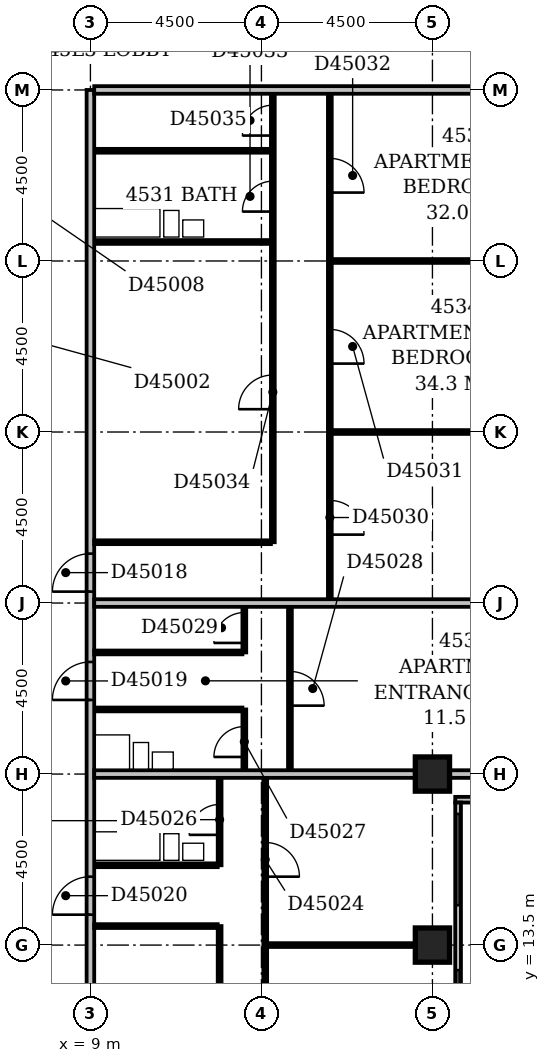
"""IFC4 building model, lengths in metres.
Left out: names, types, materials, properties, quantities, classifications, styles, units other than length and angle.
Written with IfcOpenShell. Run it as: python <this file> out.ifc"""

import sys

from ifc_helpers import new_model, si_unit, direction, frame, frame_2d, origin, origin_2d, place, context, subcontext, project, spatial, rectangle, extrude, element, fill, save


model = new_model("IFC4")
c1 = context("Model", 3, precision=1e-05, world=origin(), true_north=direction((0.0, 1.0)))
c2 = subcontext(c1, "Body", "Model", "MODEL_VIEW")
j1 = project(units=[si_unit("LENGTHUNIT", "METRE"), si_unit("PLANEANGLEUNIT", "RADIAN")], contexts=[c1])
p1 = place(None, origin())
s1 = spatial("IfcSite", under=j1, at=p1, CompositionType="ELEMENT")
p2 = place(p1, origin())
s2 = spatial("IfcBuilding", under=s1, at=p2, CompositionType="ELEMENT")
p3 = place(p2, frame((0.0, 0.0, 179.0)))
s3 = spatial("IfcBuildingStorey", under=s2, at=p3, CompositionType="ELEMENT", Elevation=179.0)
for number, where, z_axis, x_axis in (
    (1, (18.0, 13.5, -0.3), (0.0, 0.0, 1.0), (1.0, 0.0, 0.0)),
    (2, (18.0, 18.0, -0.3), (0.0, 0.0, 1.0), (1.0, 0.0, 0.0)),
):
    element("IfcColumn", number, at=place(p3, frame(where, z_axis=z_axis, x_axis=x_axis)), inside=s3, PredefinedType="COLUMN", context=c2, shape_type="SweptSolid", body=[
        extrude(rectangle(XDim=0.9, YDim=0.9, at=origin_2d()), origin(), (0.0, 0.0, 1.0), 3.6),
    ])
p4 = place(p3, frame((18.675, 8.4, 0.0), z_axis=(0.0, 0.0, 1.0), x_axis=(0.0, 1.0, 0.0)))
e3 = element("IfcWall", 3, at=p4, inside=s3, PredefinedType="STANDARD", context=c2, shape_type="SweptSolid", body=[
    extrude(rectangle(XDim=8.85, YDim=0.15, at=frame_2d((4.425, 0.0))), origin(), (0.0, 0.0, 1.0), 2.7),
])
p5 = place(p4, frame((1.291, 0.0, 0.6)))
e4 = element("IfcOpeningElement", 4, at=p5, cuts=e3, PredefinedType="OPENING", context=c2, shape_type="SweptSolid", body=[
    extrude(rectangle(XDim=0.45, YDim=1.8, at=frame_2d((0.225, 0.9))), frame((0.0, 0.087, 0.0), z_axis=(0.0, -1.0, 0.0), x_axis=(1.0, 0.0, 0.0)), (0.0, 0.0, 1.0), 0.174),
])
p6 = place(p4, frame((2.941, 0.0, 0.6)))
e5 = element("IfcOpeningElement", 5, at=p6, cuts=e3, PredefinedType="OPENING", context=c2, shape_type="SweptSolid", body=[
    extrude(rectangle(XDim=1.5, YDim=1.8, at=frame_2d((0.75, 0.9))), frame((0.0, 0.087, 0.0), z_axis=(0.0, -1.0, 0.0), x_axis=(1.0, 0.0, 0.0)), (0.0, 0.0, 1.0), 0.174),
])
p7 = place(p4, frame((6.15, 0.0, 0.6)))
e6 = element("IfcOpeningElement", 6, at=p7, cuts=e3, PredefinedType="OPENING", context=c2, shape_type="SweptSolid", body=[
    extrude(rectangle(XDim=2.4, YDim=1.8, at=frame_2d((1.2, 0.9))), frame((0.0, 0.087, 0.0), z_axis=(0.0, -1.0, 0.0), x_axis=(1.0, 0.0, 0.0)), (0.0, 0.0, 1.0), 0.174),
])
p8 = place(p3, frame((18.6, 17.325, 0.0), z_axis=(0.0, 0.0, 1.0), x_axis=(1.0, 0.0, 0.0)))
e7 = element("IfcWall", 7, at=p8, inside=s3, PredefinedType="STANDARD", context=c2, shape_type="SweptSolid", body=[
    extrude(rectangle(XDim=4.65, YDim=0.15, at=frame_2d((2.325, 0.0))), origin(), (0.0, 0.0, 1.0), 2.7),
])
p9 = place(p8, frame((0.45, 0.0, 0.6)))
e8 = element("IfcOpeningElement", 8, at=p9, cuts=e7, PredefinedType="OPENING", context=c2, shape_type="SweptSolid", body=[
    extrude(rectangle(XDim=2.4, YDim=1.8, at=frame_2d((1.2, 0.9))), frame((0.0, 0.087, 0.0), z_axis=(0.0, -1.0, 0.0), x_axis=(1.0, 0.0, 0.0)), (0.0, 0.0, 1.0), 0.174),
])
p10 = place(p3, frame((9.0, 5.0, 0.0), z_axis=(0.0, 0.0, 1.0), x_axis=(0.0, 1.0, 0.0)))
e9 = element("IfcWall", 9, at=p10, inside=s3, PredefinedType="PARTITIONING", context=c2, shape_type="SweptSolid", body=[
    extrude(rectangle(XDim=31.0, YDim=0.2, at=frame_2d((15.5, 0.0))), origin(), (0.0, 0.0, 1.0), 3.3),
])
p11 = place(p10, frame((17.8, 0.0, 0.0)))
e10 = element("IfcOpeningElement", 10, at=p11, cuts=e9, PredefinedType="OPENING", context=c2, shape_type="SweptSolid", body=[
    extrude(rectangle(XDim=1.0, YDim=2.1, at=frame_2d((0.5, 1.05))), frame((0.0, 0.112, 0.0), z_axis=(0.0, -1.0, 0.0), x_axis=(1.0, 0.0, 0.0)), (0.0, 0.0, 1.0), 0.224),
])
p12 = place(p10, frame((14.95, 0.0, 0.0)))
e11 = element("IfcOpeningElement", 11, at=p12, cuts=e9, PredefinedType="OPENING", context=c2, shape_type="SweptSolid", body=[
    extrude(rectangle(XDim=1.0, YDim=2.1, at=frame_2d((0.5, 1.05))), frame((0.0, 0.112, 0.0), z_axis=(0.0, -1.0, 0.0), x_axis=(1.0, 0.0, 0.0)), (0.0, 0.0, 1.0), 0.224),
])
p13 = place(p10, frame((9.3, 0.0, 0.0)))
e12 = element("IfcOpeningElement", 12, at=p13, cuts=e9, PredefinedType="OPENING", context=c2, shape_type="SweptSolid", body=[
    extrude(rectangle(XDim=1.0, YDim=2.1, at=frame_2d((0.5, 1.05))), frame((0.0, 0.112, 0.0), z_axis=(0.0, -1.0, 0.0), x_axis=(1.0, 0.0, 0.0)), (0.0, 0.0, 1.0), 0.224),
])
p14 = place(p10, frame((1.5, 0.0, 0.0)))
e13 = element("IfcOpeningElement", 13, at=p14, cuts=e9, PredefinedType="OPENING", context=c2, shape_type="SweptSolid", body=[
    extrude(rectangle(XDim=0.9, YDim=2.1, at=frame_2d((0.45, 1.05))), frame((0.0, 0.112, 0.0), z_axis=(0.0, -1.0, 0.0), x_axis=(1.0, 0.0, 0.0)), (0.0, 0.0, 1.0), 0.224),
])
p15 = place(p3, frame((12.4, 9.1, 0.0), z_axis=(0.0, 0.0, 1.0), x_axis=(0.0, 1.0, 0.0)))
e14 = element("IfcWall", 14, at=p15, inside=s3, PredefinedType="PARTITIONING", context=c2, shape_type="SweptSolid", body=[
    extrude(rectangle(XDim=4.9, YDim=0.1, at=frame_2d((2.45, 0.0))), origin(), (0.0, 0.0, 1.0), 3.3),
])
p16 = place(p15, frame((1.95, 0.0, 0.0)))
e15 = element("IfcOpeningElement", 15, at=p16, cuts=e14, PredefinedType="OPENING", context=c2, shape_type="SweptSolid", body=[
    extrude(rectangle(XDim=0.9, YDim=2.1, at=frame_2d((0.45, 1.05))), frame((0.0, 0.062, 0.0), z_axis=(0.0, -1.0, 0.0), x_axis=(1.0, 0.0, 0.0)), (0.0, 0.0, 1.0), 0.124),
])
p17 = place(p3, frame((13.6, 9.45, 0.0), z_axis=(0.0, 0.0, 1.0), x_axis=(0.0, 1.0, 0.0)))
e16 = element("IfcWall", 16, at=p17, inside=s3, PredefinedType="PARTITIONING", context=c2, shape_type="SweptSolid", body=[
    extrude(rectangle(XDim=8.45, YDim=0.1, at=frame_2d((4.225, 0.0))), origin(), (0.0, 0.0, 1.0), 3.3),
])
p18 = place(p17, frame((1.35, 0.0, 0.0)))
e17 = element("IfcOpeningElement", 17, at=p18, cuts=e16, PredefinedType="OPENING", context=c2, shape_type="SweptSolid", body=[
    extrude(rectangle(XDim=0.9, YDim=2.1, at=frame_2d((0.45, 1.05))), frame((0.0, 0.062, 0.0), z_axis=(0.0, -1.0, 0.0), x_axis=(1.0, 0.0, 0.0)), (0.0, 0.0, 1.0), 0.124),
])
p19 = place(p17, frame((5.85, 0.0, 0.0)))
e18 = element("IfcOpeningElement", 18, at=p19, cuts=e16, PredefinedType="OPENING", context=c2, shape_type="SweptSolid", body=[
    extrude(rectangle(XDim=0.9, YDim=2.1, at=frame_2d((0.45, 1.05))), frame((0.0, 0.062, 0.0), z_axis=(0.0, -1.0, 0.0), x_axis=(1.0, 0.0, 0.0)), (0.0, 0.0, 1.0), 0.124),
])
p20 = place(p3, frame((13.65, 13.5, 0.0), z_axis=(0.0, 0.0, 1.0), x_axis=(1.0, 0.0, 0.0)))
e19 = element("IfcWall", 19, at=p20, inside=s3, PredefinedType="PARTITIONING", context=c2, shape_type="SweptSolid", body=[
    extrude(rectangle(XDim=3.9, YDim=0.1, at=frame_2d((1.95, 0.0))), origin(), (0.0, 0.0, 1.0), 3.3),
])
p21 = place(p3, frame((9.1, 14.0, 0.0), z_axis=(0.0, 0.0, 1.0), x_axis=(1.0, 0.0, 0.0)))
e20 = element("IfcWall", 20, at=p21, inside=s3, PredefinedType="PARTITIONING", context=c2, shape_type="SweptSolid", body=[
    extrude(rectangle(XDim=3.25, YDim=0.1, at=frame_2d((1.625, 0.0))), origin(), (0.0, 0.0, 1.0), 3.3),
])
p22 = place(p3, frame((9.1, 15.6, 0.0), z_axis=(0.0, 0.0, 1.0), x_axis=(1.0, 0.0, 0.0)))
e21 = element("IfcWall", 21, at=p22, inside=s3, PredefinedType="PLUMBINGWALL", context=c2, shape_type="SweptSolid", body=[
    extrude(rectangle(XDim=3.25, YDim=0.1, at=frame_2d((1.625, 0.0))), origin(), (0.0, 0.0, 1.0), 3.3),
])
p23 = place(p3, frame((12.4, 15.6, 0.0), z_axis=(0.0, 0.0, 1.0), x_axis=(0.0, 1.0, 0.0)))
e22 = element("IfcWall", 22, at=p23, inside=s3, PredefinedType="PARTITIONING", context=c2, shape_type="SweptSolid", body=[
    extrude(rectangle(XDim=2.3, YDim=0.1, at=frame_2d((1.15, 0.0))), origin(), (0.0, 0.0, 1.0), 3.3),
])
p24 = place(p23, frame((0.8, 0.0, 0.0)))
e23 = element("IfcOpeningElement", 23, at=p24, cuts=e22, PredefinedType="OPENING", context=c2, shape_type="SweptSolid", body=[
    extrude(rectangle(XDim=0.8, YDim=2.1, at=frame_2d((0.4, 1.05))), frame((0.0, 0.062, 0.0), z_axis=(0.0, -1.0, 0.0), x_axis=(1.0, 0.0, 0.0)), (0.0, 0.0, 1.0), 0.124),
])
p25 = place(p3, frame((9.1, 18.0, 0.0), z_axis=(0.0, 0.0, 1.0), x_axis=(1.0, 0.0, 0.0)))
e24 = element("IfcWall", 24, at=p25, inside=s3, PredefinedType="PARTITIONING", context=c2, shape_type="SweptSolid", body=[
    extrude(rectangle(XDim=8.45, YDim=0.2, at=frame_2d((4.225, 0.0))), origin(), (0.0, 0.0, 1.0), 2.6),
])
p26 = place(p3, frame((18.45, 18.0, 0.0), z_axis=(0.0, 0.0, 1.0), x_axis=(1.0, 0.0, 0.0)))
e25 = element("IfcWall", 25, at=p26, inside=s3, PredefinedType="PARTITIONING", context=c2, shape_type="SweptSolid", body=[
    extrude(rectangle(XDim=3.6, YDim=0.2, at=frame_2d((1.8, 0.0))), origin(), (0.0, 0.0, 1.0), 2.7),
])
p27 = place(p3, frame((13.05, 18.1, 0.0), z_axis=(0.0, 0.0, 1.0), x_axis=(0.0, 1.0, 0.0)))
e26 = element("IfcWall", 26, at=p27, inside=s3, PredefinedType="PARTITIONING", context=c2, shape_type="SweptSolid", body=[
    extrude(rectangle(XDim=1.6, YDim=0.1, at=frame_2d((0.8, 0.0))), origin(), (0.0, 0.0, 1.0), 3.3),
])
p28 = place(p27, frame((0.35, 0.0, 0.0)))
e27 = element("IfcOpeningElement", 27, at=p28, cuts=e26, PredefinedType="OPENING", context=c2, shape_type="SweptSolid", body=[
    extrude(rectangle(XDim=0.8, YDim=2.1, at=frame_2d((0.4, 1.05))), frame((0.0, 0.062, 0.0), z_axis=(0.0, -1.0, 0.0), x_axis=(1.0, 0.0, 0.0)), (0.0, 0.0, 1.0), 0.124),
])
p29 = place(p3, frame((14.25, 18.1, 0.0), z_axis=(0.0, 0.0, 1.0), x_axis=(0.0, 1.0, 0.0)))
e28 = element("IfcWall", 28, at=p29, inside=s3, PredefinedType="PARTITIONING", context=c2, shape_type="SweptSolid", body=[
    extrude(rectangle(XDim=4.3, YDim=0.1, at=frame_2d((2.15, 0.0))), origin(), (0.0, 0.0, 1.0), 3.3),
])
p30 = place(p29, frame((1.7, 0.0, 0.0)))
e29 = element("IfcOpeningElement", 29, at=p30, cuts=e28, PredefinedType="OPENING", context=c2, shape_type="SweptSolid", body=[
    extrude(rectangle(XDim=0.9, YDim=2.1, at=frame_2d((0.45, 1.05))), frame((0.0, 0.062, 0.0), z_axis=(0.0, -1.0, 0.0), x_axis=(1.0, 0.0, 0.0)), (0.0, 0.0, 1.0), 0.124),
])
p31 = place(p3, frame((9.1, 19.7, 0.0), z_axis=(0.0, 0.0, 1.0), x_axis=(1.0, 0.0, 0.0)))
e30 = element("IfcWall", 30, at=p31, inside=s3, PredefinedType="PLUMBINGWALL", context=c2, shape_type="SweptSolid", body=[
    extrude(rectangle(XDim=3.9, YDim=0.1, at=frame_2d((1.95, 0.0))), origin(), (0.0, 0.0, 1.0), 3.3),
])
p32 = place(p3, frame((9.1, 21.2, 0.0), z_axis=(0.0, 0.0, 1.0), x_axis=(1.0, 0.0, 0.0)))
e31 = element("IfcWall", 31, at=p32, inside=s3, PredefinedType="PARTITIONING", context=c2, shape_type="SweptSolid", body=[
    extrude(rectangle(XDim=3.9, YDim=0.1, at=frame_2d((1.95, 0.0))), origin(), (0.0, 0.0, 1.0), 3.3),
])
p33 = place(p3, frame((13.05, 21.2, 0.0), z_axis=(0.0, 0.0, 1.0), x_axis=(0.0, 1.0, 0.0)))
e32 = element("IfcWall", 32, at=p33, inside=s3, PredefinedType="PARTITIONING", context=c2, shape_type="SweptSolid", body=[
    extrude(rectangle(XDim=1.2, YDim=0.1, at=frame_2d((0.6, 0.0))), origin(), (0.0, 0.0, 1.0), 3.3),
])
p34 = place(p33, frame((0.25, 0.0, 0.0)))
e33 = element("IfcOpeningElement", 33, at=p34, cuts=e32, PredefinedType="OPENING", context=c2, shape_type="SweptSolid", body=[
    extrude(rectangle(XDim=0.8, YDim=2.1, at=frame_2d((0.4, 1.05))), frame((0.0, 0.062, 0.0), z_axis=(0.0, -1.0, 0.0), x_axis=(1.0, 0.0, 0.0)), (0.0, 0.0, 1.0), 0.124),
])
p35 = place(p3, frame((9.1, 22.5, 0.0), z_axis=(0.0, 0.0, 1.0), x_axis=(1.0, 0.0, 0.0)))
e34 = element("IfcWall", 34, at=p35, inside=s3, PredefinedType="PARTITIONING", context=c2, shape_type="SweptSolid", body=[
    extrude(rectangle(XDim=12.95, YDim=0.2, at=frame_2d((6.475, 0.0))), origin(), (0.0, 0.0, 1.0), 3.3),
])
p36 = place(p3, frame((15.3, 22.6, 0.0), z_axis=(0.0, 0.0, 1.0), x_axis=(0.0, 1.0, 0.0)))
e35 = element("IfcWall", 35, at=p36, inside=s3, PredefinedType="PARTITIONING", context=c2, shape_type="SweptSolid", body=[
    extrude(rectangle(XDim=13.3, YDim=0.1, at=frame_2d((6.65, 0.0))), origin(), (0.0, 0.0, 1.0), 3.3),
])
p37 = place(p36, frame((1.7, 0.0, 0.0)))
e36 = element("IfcOpeningElement", 36, at=p37, cuts=e35, PredefinedType="OPENING", context=c2, shape_type="SweptSolid", body=[
    extrude(rectangle(XDim=0.9, YDim=2.1, at=frame_2d((0.45, 1.05))), frame((0.0, 0.062, 0.0), z_axis=(0.0, -1.0, 0.0), x_axis=(1.0, 0.0, 0.0)), (0.0, 0.0, 1.0), 0.124),
])
p38 = place(p36, frame((6.2, 0.0, 0.0)))
e37 = element("IfcOpeningElement", 37, at=p38, cuts=e35, PredefinedType="OPENING", context=c2, shape_type="SweptSolid", body=[
    extrude(rectangle(XDim=0.9, YDim=2.1, at=frame_2d((0.45, 1.05))), frame((0.0, 0.062, 0.0), z_axis=(0.0, -1.0, 0.0), x_axis=(1.0, 0.0, 0.0)), (0.0, 0.0, 1.0), 0.124),
])
p39 = place(p36, frame((10.7, 0.0, 0.0)))
e38 = element("IfcOpeningElement", 38, at=p39, cuts=e35, PredefinedType="OPENING", context=c2, shape_type="SweptSolid", body=[
    extrude(rectangle(XDim=0.9, YDim=2.1, at=frame_2d((0.45, 1.05))), frame((0.0, 0.062, 0.0), z_axis=(0.0, -1.0, 0.0), x_axis=(1.0, 0.0, 0.0)), (0.0, 0.0, 1.0), 0.124),
])
p40 = place(p3, frame((9.1, 24.1, 0.0), z_axis=(0.0, 0.0, 1.0), x_axis=(1.0, 0.0, 0.0)))
e39 = element("IfcWall", 39, at=p40, inside=s3, PredefinedType="PARTITIONING", context=c2, shape_type="SweptSolid", body=[
    extrude(rectangle(XDim=4.65, YDim=0.1, at=frame_2d((2.325, 0.0))), origin(), (0.0, 0.0, 1.0), 3.3),
])
p41 = place(p3, frame((13.8, 24.1, 0.0), z_axis=(0.0, 0.0, 1.0), x_axis=(0.0, 1.0, 0.0)))
e40 = element("IfcWall", 40, at=p41, inside=s3, PredefinedType="PARTITIONING", context=c2, shape_type="SweptSolid", body=[
    extrude(rectangle(XDim=11.8, YDim=0.1, at=frame_2d((5.9, 0.0))), origin(), (0.0, 0.0, 1.0), 3.3),
])
p42 = place(p41, frame((8.7, 0.0, 0.0)))
e41 = element("IfcOpeningElement", 41, at=p42, cuts=e40, PredefinedType="OPENING", context=c2, shape_type="SweptSolid", body=[
    extrude(rectangle(XDim=0.8, YDim=2.1, at=frame_2d((0.4, 1.05))), frame((0.0, 0.062, 0.0), z_axis=(0.0, -1.0, 0.0), x_axis=(1.0, 0.0, 0.0)), (0.0, 0.0, 1.0), 0.124),
])
p43 = place(p41, frame((3.5, 0.0, 0.0)))
e42 = element("IfcOpeningElement", 42, at=p43, cuts=e40, PredefinedType="OPENING", context=c2, shape_type="SweptSolid", body=[
    extrude(rectangle(XDim=0.9, YDim=2.1, at=frame_2d((0.45, 1.05))), frame((0.0, 0.062, 0.0), z_axis=(0.0, -1.0, 0.0), x_axis=(1.0, 0.0, 0.0)), (0.0, 0.0, 1.0), 0.124),
])
p44 = place(p41, frame((10.7, 0.0, 0.0)))
e43 = element("IfcOpeningElement", 43, at=p44, cuts=e40, PredefinedType="OPENING", context=c2, shape_type="SweptSolid", body=[
    extrude(rectangle(XDim=0.8, YDim=2.1, at=frame_2d((0.4, 1.05))), frame((0.0, 0.062, 0.0), z_axis=(0.0, -1.0, 0.0), x_axis=(1.0, 0.0, 0.0)), (0.0, 0.0, 1.0), 0.124),
])
p45 = place(p3, frame((15.35, 27.0, 0.0), z_axis=(0.0, 0.0, 1.0), x_axis=(1.0, 0.0, 0.0)))
e44 = element("IfcWall", 44, at=p45, inside=s3, PredefinedType="PARTITIONING", context=c2, shape_type="SweptSolid", body=[
    extrude(rectangle(XDim=6.7, YDim=0.1, at=frame_2d((3.35, 0.0))), origin(), (0.0, 0.0, 1.0), 2.7),
])
p46 = place(p3, frame((15.35, 31.5, 0.0), z_axis=(0.0, 0.0, 1.0), x_axis=(1.0, 0.0, 0.0)))
e45 = element("IfcWall", 45, at=p46, inside=s3, PredefinedType="PARTITIONING", context=c2, shape_type="SweptSolid", body=[
    extrude(rectangle(XDim=6.7, YDim=0.1, at=frame_2d((3.35, 0.0))), origin(), (0.0, 0.0, 1.0), 3.3),
])
for number, where, z_axis, x_axis in (
    (46, (9.1, 32.0, 0.0), (0.0, 0.0, 1.0), (1.0, 0.0, 0.0)),
    (47, (9.1, 34.4, 0.0), (0.0, 0.0, 1.0), (1.0, 0.0, 0.0)),
):
    element("IfcWall", number, at=place(p3, frame(where, z_axis=z_axis, x_axis=x_axis)), inside=s3, PredefinedType="PLUMBINGWALL", context=c2, shape_type="SweptSolid", body=[
        extrude(rectangle(XDim=4.65, YDim=0.1, at=frame_2d((2.325, 0.0))), origin(), (0.0, 0.0, 1.0), 3.3),
    ])
p47 = place(p3, frame((9.1, 36.0, 0.0), z_axis=(0.0, 0.0, 1.0), x_axis=(1.0, 0.0, 0.0)))
e48 = element("IfcWall", 48, at=p47, inside=s3, PredefinedType="PARTITIONING", context=c2, shape_type="SweptSolid", body=[
    extrude(rectangle(XDim=12.95, YDim=0.2, at=frame_2d((6.475, 0.0))), origin(), (0.0, 0.0, 1.0), 3.3),
])
p48 = place(p6, origin())
e49 = element("IfcWindow", 49, at=p48, inside=s3, PartitioningType="SINGLE_PANEL", PredefinedType="WINDOW", context=c2, shape_type="SweptSolid", body=[
    extrude(rectangle(XDim=1.5, YDim=1.8, at=frame_2d((0.75, 0.9))), frame((0.0, 0.03, 0.0), z_axis=(0.0, -1.0, 0.0), x_axis=(1.0, 0.0, 0.0)), (0.0, 0.0, 1.0), 0.06),
])
fill(e5, e49)
p49 = place(p7, origin())
e50 = element("IfcWindow", 50, at=p49, inside=s3, PartitioningType="SINGLE_PANEL", PredefinedType="WINDOW", context=c2, shape_type="SweptSolid", body=[
    extrude(rectangle(XDim=2.4, YDim=1.8, at=frame_2d((1.2, 0.9))), frame((0.0, 0.03, 0.0), z_axis=(0.0, -1.0, 0.0), x_axis=(1.0, 0.0, 0.0)), (0.0, 0.0, 1.0), 0.06),
])
fill(e6, e50)
p50 = place(p11, origin())
e51 = element("IfcDoor", 51, at=p50, inside=s3, OperationType="SINGLE_SWING_LEFT", PredefinedType="DOOR", context=c2, shape_type="SweptSolid", body=[
    extrude(rectangle(XDim=1.0, YDim=2.1, at=frame_2d((0.5, 1.05))), frame((0.0, 0.025, 0.0), z_axis=(0.0, -1.0, 0.0), x_axis=(1.0, 0.0, 0.0)), (0.0, 0.0, 1.0), 0.05),
])
fill(e10, e51)
p51 = place(p12, origin())
e52 = element("IfcDoor", 52, at=p51, inside=s3, OperationType="SINGLE_SWING_LEFT", PredefinedType="DOOR", context=c2, shape_type="SweptSolid", body=[
    extrude(rectangle(XDim=1.0, YDim=2.1, at=frame_2d((0.5, 1.05))), frame((0.0, 0.025, 0.0), z_axis=(0.0, -1.0, 0.0), x_axis=(1.0, 0.0, 0.0)), (0.0, 0.0, 1.0), 0.05),
])
fill(e11, e52)
p52 = place(p13, origin())
e53 = element("IfcDoor", 53, at=p52, inside=s3, OperationType="SINGLE_SWING_LEFT", PredefinedType="DOOR", context=c2, shape_type="SweptSolid", body=[
    extrude(rectangle(XDim=1.0, YDim=2.1, at=frame_2d((0.5, 1.05))), frame((0.0, 0.025, 0.0), z_axis=(0.0, -1.0, 0.0), x_axis=(1.0, 0.0, 0.0)), (0.0, 0.0, 1.0), 0.05),
])
fill(e12, e53)
p53 = place(p19, frame((0.9, 0.0, 0.0), z_axis=(0.0, 0.0, 1.0), x_axis=(-1.0, 0.0, 0.0)))
e54 = element("IfcDoor", 54, at=p53, inside=s3, OperationType="SINGLE_SWING_RIGHT", PredefinedType="DOOR", context=c2, shape_type="SweptSolid", body=[
    extrude(rectangle(XDim=0.9, YDim=2.1, at=frame_2d((0.45, 1.05))), frame((0.0, 0.025, 0.0), z_axis=(0.0, -1.0, 0.0), x_axis=(1.0, 0.0, 0.0)), (0.0, 0.0, 1.0), 0.05),
])
fill(e18, e54)
p54 = place(p24, origin())
e55 = element("IfcDoor", 55, at=p54, inside=s3, OperationType="SINGLE_SWING_LEFT", PredefinedType="DOOR", context=c2, shape_type="SweptSolid", body=[
    extrude(rectangle(XDim=0.8, YDim=2.1, at=frame_2d((0.4, 1.05))), frame((0.0, 0.025, 0.0), z_axis=(0.0, -1.0, 0.0), x_axis=(1.0, 0.0, 0.0)), (0.0, 0.0, 1.0), 0.05),
])
fill(e23, e55)
p55 = place(p28, origin())
e56 = element("IfcDoor", 56, at=p55, inside=s3, OperationType="SINGLE_SWING_LEFT", PredefinedType="DOOR", context=c2, shape_type="SweptSolid", body=[
    extrude(rectangle(XDim=0.8, YDim=2.1, at=frame_2d((0.4, 1.05))), frame((0.0, 0.025, 0.0), z_axis=(0.0, -1.0, 0.0), x_axis=(1.0, 0.0, 0.0)), (0.0, 0.0, 1.0), 0.05),
])
fill(e27, e56)
p56 = place(p30, frame((0.9, 0.0, 0.0), z_axis=(0.0, 0.0, 1.0), x_axis=(-1.0, 0.0, 0.0)))
e57 = element("IfcDoor", 57, at=p56, inside=s3, OperationType="SINGLE_SWING_RIGHT", PredefinedType="DOOR", context=c2, shape_type="SweptSolid", body=[
    extrude(rectangle(XDim=0.9, YDim=2.1, at=frame_2d((0.45, 1.05))), frame((0.0, 0.025, 0.0), z_axis=(0.0, -1.0, 0.0), x_axis=(1.0, 0.0, 0.0)), (0.0, 0.0, 1.0), 0.05),
])
fill(e29, e57)
p57 = place(p34, origin())
e58 = element("IfcDoor", 58, at=p57, inside=s3, OperationType="SINGLE_SWING_LEFT", PredefinedType="DOOR", context=c2, shape_type="SweptSolid", body=[
    extrude(rectangle(XDim=0.8, YDim=2.1, at=frame_2d((0.4, 1.05))), frame((0.0, 0.025, 0.0), z_axis=(0.0, -1.0, 0.0), x_axis=(1.0, 0.0, 0.0)), (0.0, 0.0, 1.0), 0.05),
])
fill(e33, e58)
p58 = place(p37, frame((0.9, 0.0, 0.0), z_axis=(0.0, 0.0, 1.0), x_axis=(-1.0, 0.0, 0.0)))
e59 = element("IfcDoor", 59, at=p58, inside=s3, OperationType="SINGLE_SWING_RIGHT", PredefinedType="DOOR", context=c2, shape_type="SweptSolid", body=[
    extrude(rectangle(XDim=0.9, YDim=2.1, at=frame_2d((0.45, 1.05))), frame((0.0, 0.025, 0.0), z_axis=(0.0, -1.0, 0.0), x_axis=(1.0, 0.0, 0.0)), (0.0, 0.0, 1.0), 0.05),
])
fill(e36, e59)
p59 = place(p38, frame((0.9, 0.0, 0.0), z_axis=(0.0, 0.0, 1.0), x_axis=(-1.0, 0.0, 0.0)))
e60 = element("IfcDoor", 60, at=p59, inside=s3, OperationType="SINGLE_SWING_RIGHT", PredefinedType="DOOR", context=c2, shape_type="SweptSolid", body=[
    extrude(rectangle(XDim=0.9, YDim=2.1, at=frame_2d((0.45, 1.05))), frame((0.0, 0.025, 0.0), z_axis=(0.0, -1.0, 0.0), x_axis=(1.0, 0.0, 0.0)), (0.0, 0.0, 1.0), 0.05),
])
fill(e37, e60)
p60 = place(p39, frame((0.9, 0.0, 0.0), z_axis=(0.0, 0.0, 1.0), x_axis=(-1.0, 0.0, 0.0)))
e61 = element("IfcDoor", 61, at=p60, inside=s3, OperationType="SINGLE_SWING_RIGHT", PredefinedType="DOOR", context=c2, shape_type="SweptSolid", body=[
    extrude(rectangle(XDim=0.9, YDim=2.1, at=frame_2d((0.45, 1.05))), frame((0.0, 0.025, 0.0), z_axis=(0.0, -1.0, 0.0), x_axis=(1.0, 0.0, 0.0)), (0.0, 0.0, 1.0), 0.05),
])
fill(e38, e61)
p61 = place(p42, origin())
e62 = element("IfcDoor", 62, at=p61, inside=s3, OperationType="SINGLE_SWING_LEFT", PredefinedType="DOOR", context=c2, shape_type="SweptSolid", body=[
    extrude(rectangle(XDim=0.8, YDim=2.1, at=frame_2d((0.4, 1.05))), frame((0.0, 0.025, 0.0), z_axis=(0.0, -1.0, 0.0), x_axis=(1.0, 0.0, 0.0)), (0.0, 0.0, 1.0), 0.05),
])
fill(e41, e62)
p62 = place(p43, origin())
e63 = element("IfcDoor", 63, at=p62, inside=s3, OperationType="SINGLE_SWING_LEFT", PredefinedType="DOOR", context=c2, shape_type="SweptSolid", body=[
    extrude(rectangle(XDim=0.9, YDim=2.1, at=frame_2d((0.45, 1.05))), frame((0.0, 0.025, 0.0), z_axis=(0.0, -1.0, 0.0), x_axis=(1.0, 0.0, 0.0)), (0.0, 0.0, 1.0), 0.05),
])
fill(e42, e63)
p63 = place(p44, origin())
e64 = element("IfcDoor", 64, at=p63, inside=s3, OperationType="SINGLE_SWING_LEFT", PredefinedType="DOOR", context=c2, shape_type="SweptSolid", body=[
    extrude(rectangle(XDim=0.8, YDim=2.1, at=frame_2d((0.4, 1.05))), frame((0.0, 0.025, 0.0), z_axis=(0.0, -1.0, 0.0), x_axis=(1.0, 0.0, 0.0)), (0.0, 0.0, 1.0), 0.05),
])
fill(e43, e64)
save(model, sys.argv[1])
